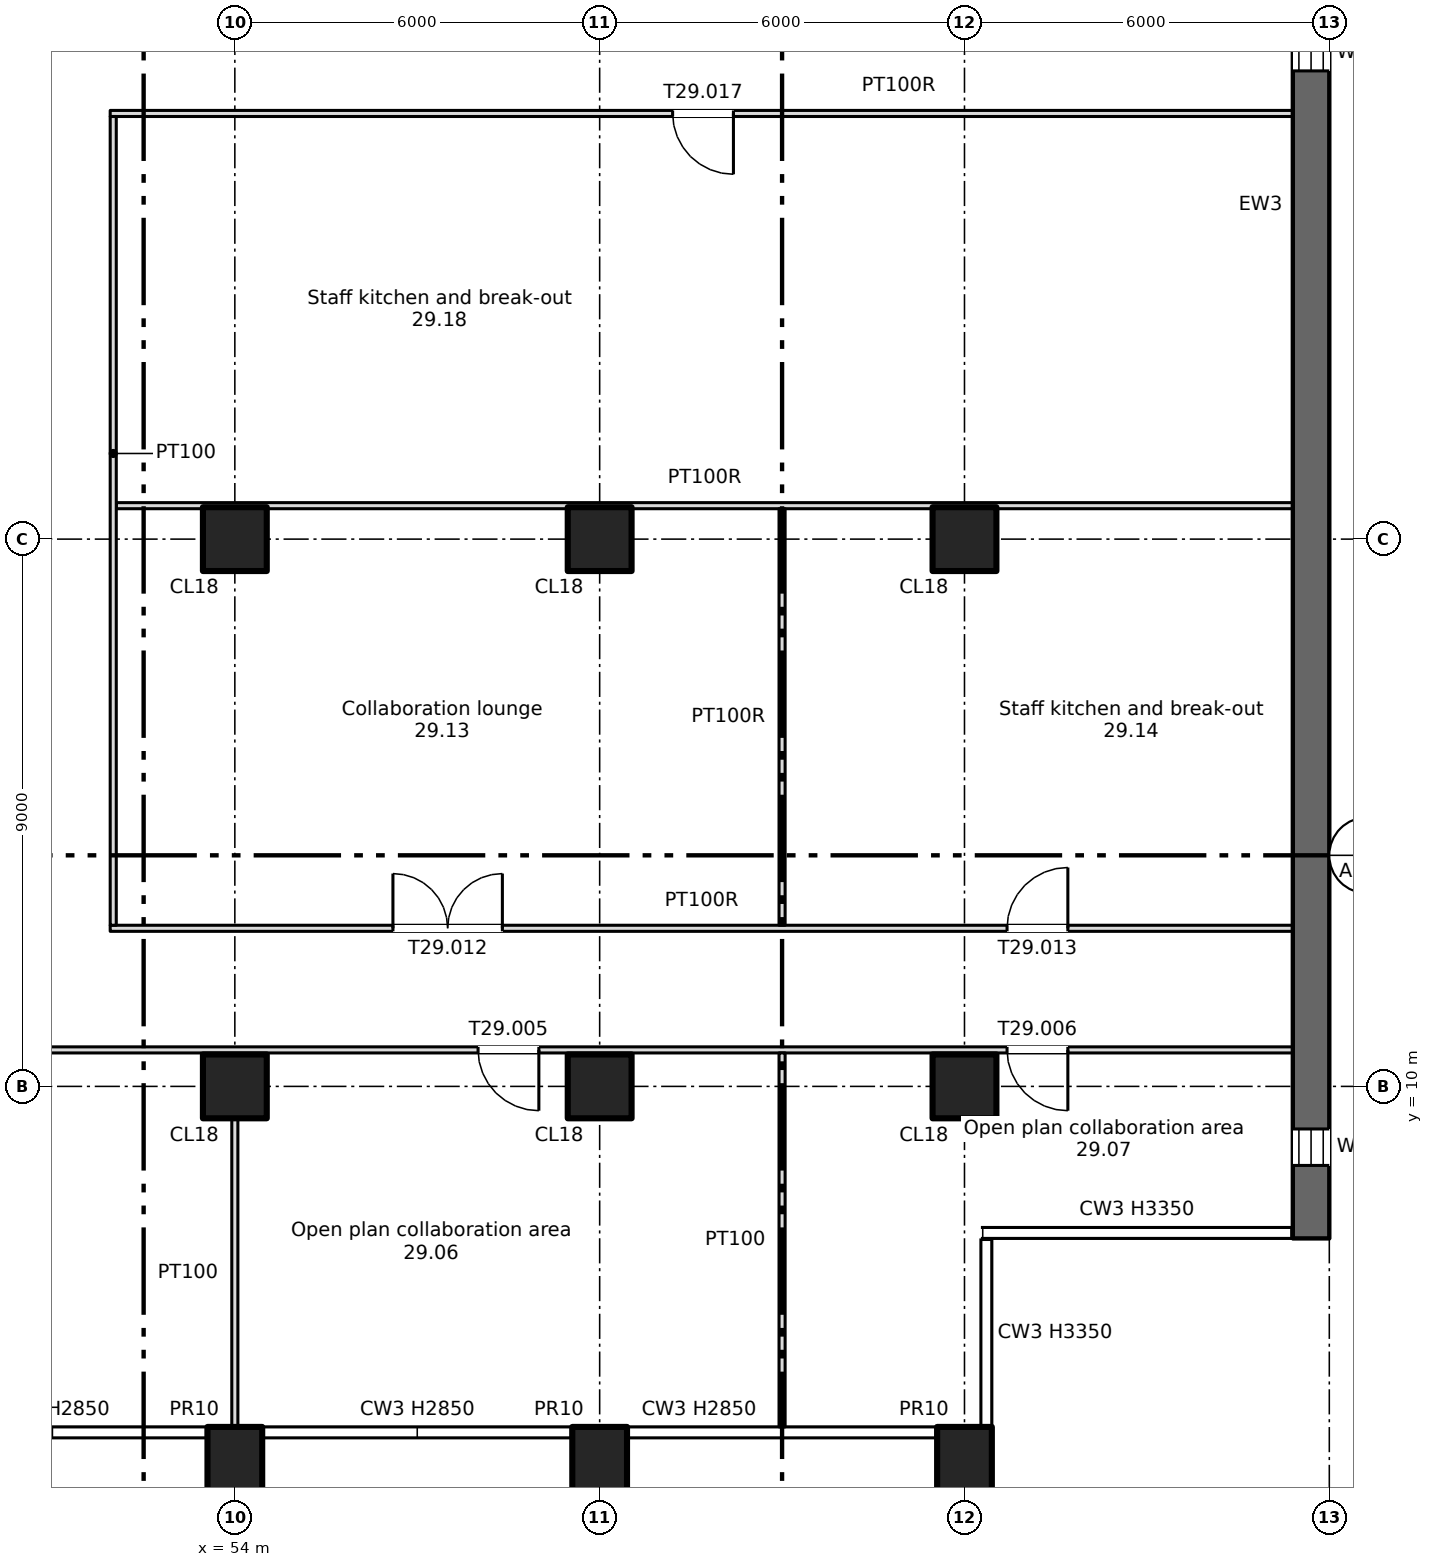
"""IFC4 building model, lengths in metres.
Left out: names, types, materials, properties, quantities, classifications, styles, units other than length and angle.
Written with IfcOpenShell. Run it as: python <this file> out.ifc"""

import sys

from ifc_helpers import new_model, si_unit, direction, frame, frame_2d, origin, origin_2d, place, context, subcontext, project, spatial, rectangle, extrude, element, fill, save


model = new_model("IFC4")
c1 = context("Model", 3, precision=1e-05, world=origin(), true_north=direction((0.0, 1.0)))
c2 = subcontext(c1, "Body", "Model", "MODEL_VIEW")
j1 = project(units=[si_unit("LENGTHUNIT", "METRE"), si_unit("PLANEANGLEUNIT", "RADIAN")], contexts=[c1])
p1 = place(None, origin())
s1 = spatial("IfcSite", under=j1, at=p1, CompositionType="ELEMENT")
p2 = place(p1, origin())
s2 = spatial("IfcBuilding", under=s1, at=p2, CompositionType="ELEMENT")
p3 = place(p2, frame((0.0, 0.0, 204.25)))
s3 = spatial("IfcBuildingStorey", under=s2, at=p3, CompositionType="ELEMENT", Elevation=204.25)
for number, where, z_axis, x_axis in (
    (1, (54.0, 3.7, -0.4), (0.0, 0.0, 1.0), (1.0, 0.0, 0.0)),
    (2, (60.0, 3.7, -0.4), (0.0, 0.0, 1.0), (1.0, 0.0, 0.0)),
    (3, (66.0, 3.7, -0.4), (0.0, 0.0, 1.0), (1.0, 0.0, 0.0)),
):
    element("IfcColumn", number, at=place(p3, frame(where, z_axis=z_axis, x_axis=x_axis)), inside=s3, PredefinedType="COLUMN", context=c2, shape_type="SweptSolid", body=[
        extrude(rectangle(XDim=0.9, YDim=1.4, at=origin_2d()), origin(), (0.0, 0.0, 1.0), 3.75),
    ])
for number, where, z_axis, x_axis in (
    (4, (54.0, 10.0, 0.0), (0.0, 0.0, 1.0), (1.0, 0.0, 0.0)),
    (5, (54.0, 19.0, 0.0), (0.0, 0.0, 1.0), (1.0, 0.0, 0.0)),
    (6, (60.0, 10.0, 0.0), (0.0, 0.0, 1.0), (1.0, 0.0, 0.0)),
    (7, (60.0, 19.0, 0.0), (0.0, 0.0, 1.0), (1.0, 0.0, 0.0)),
    (8, (66.0, 10.0, 0.0), (0.0, 0.0, 1.0), (1.0, 0.0, 0.0)),
    (9, (66.0, 19.0, 0.0), (0.0, 0.0, 1.0), (1.0, 0.0, 0.0)),
):
    element("IfcColumn", number, at=place(p3, frame(where, z_axis=z_axis, x_axis=x_axis)), inside=s3, PredefinedType="COLUMN", context=c2, shape_type="SweptSolid", body=[
        extrude(rectangle(XDim=1.05, YDim=1.05, at=origin_2d()), origin(), (0.0, 0.0, 1.0), 3.35),
    ])
p4 = place(p3, frame((71.7, 7.5, 0.0), z_axis=(0.0, 0.0, 1.0), x_axis=(0.0, 1.0, 0.0)))
e10 = element("IfcWall", 10, at=p4, inside=s3, PredefinedType="SHEAR", context=c2, shape_type="SweptSolid", body=[
    extrude(rectangle(XDim=34.0, YDim=0.6, at=frame_2d((17.0, 0.0))), origin(), (0.0, 0.0, 1.0), 3.35),
])
p5 = place(p4, frame((1.2, 0.0, 0.6)))
e11 = element("IfcOpeningElement", 11, at=p5, cuts=e10, PredefinedType="OPENING", context=c2, shape_type="SweptSolid", body=[
    extrude(rectangle(XDim=0.6, YDim=2.4, at=frame_2d((0.3, 1.2))), frame((0.0, 0.31, 0.0), z_axis=(0.0, -1.0, 0.0), x_axis=(1.0, 0.0, 0.0)), (0.0, 0.0, 1.0), 0.62),
])
p6 = place(p4, frame((19.2, 0.0, 0.6)))
e12 = element("IfcOpeningElement", 12, at=p6, cuts=e10, PredefinedType="OPENING", context=c2, shape_type="SweptSolid", body=[
    extrude(rectangle(XDim=0.6, YDim=2.4, at=frame_2d((0.3, 1.2))), frame((0.0, 0.31, 0.0), z_axis=(0.0, -1.0, 0.0), x_axis=(1.0, 0.0, 0.0)), (0.0, 0.0, 1.0), 0.62),
])
p7 = place(p4, frame((25.2, 0.0, 0.6)))
e13 = element("IfcOpeningElement", 13, at=p7, cuts=e10, PredefinedType="OPENING", context=c2, shape_type="SweptSolid", body=[
    extrude(rectangle(XDim=0.6, YDim=2.4, at=frame_2d((0.3, 1.2))), frame((0.0, 0.31, 0.0), z_axis=(0.0, -1.0, 0.0), x_axis=(1.0, 0.0, 0.0)), (0.0, 0.0, 1.0), 0.62),
])
p8 = place(p4, frame((31.2, 0.0, 0.6)))
e14 = element("IfcOpeningElement", 14, at=p8, cuts=e10, PredefinedType="OPENING", context=c2, shape_type="SweptSolid", body=[
    extrude(rectangle(XDim=0.6, YDim=2.4, at=frame_2d((0.3, 1.2))), frame((0.0, 0.31, 0.0), z_axis=(0.0, -1.0, 0.0), x_axis=(1.0, 0.0, 0.0)), (0.0, 0.0, 1.0), 0.62),
])
p9 = place(p3, frame((6.6, 10.6, 0.0), z_axis=(0.0, 0.0, 1.0), x_axis=(1.0, 0.0, 0.0)))
e15 = element("IfcWall", 15, at=p9, inside=s3, PredefinedType="PARTITIONING", context=c2, shape_type="SweptSolid", body=[
    extrude(rectangle(XDim=64.8, YDim=0.1, at=frame_2d((32.4, 0.0))), origin(), (0.0, 0.0, 1.0), 3.35),
])
p10 = place(p9, frame((12.0, 0.0, 0.0)))
e16 = element("IfcOpeningElement", 16, at=p10, cuts=e15, PredefinedType="OPENING", context=c2, shape_type="SweptSolid", body=[
    extrude(rectangle(XDim=1.8, YDim=2.1, at=frame_2d((0.9, 1.05))), frame((0.0, 0.06, 0.0), z_axis=(0.0, -1.0, 0.0), x_axis=(1.0, 0.0, 0.0)), (0.0, 0.0, 1.0), 0.12),
])
p11 = place(p9, frame((19.9, 0.0, 0.0)))
e17 = element("IfcOpeningElement", 17, at=p11, cuts=e15, PredefinedType="OPENING", context=c2, shape_type="SweptSolid", body=[
    extrude(rectangle(XDim=1.0, YDim=2.1, at=frame_2d((0.5, 1.05))), frame((0.0, 0.06, 0.0), z_axis=(0.0, -1.0, 0.0), x_axis=(1.0, 0.0, 0.0)), (0.0, 0.0, 1.0), 0.12),
])
p12 = place(p9, frame((30.0, 0.0, 0.0)))
e18 = element("IfcOpeningElement", 18, at=p12, cuts=e15, PredefinedType="OPENING", context=c2, shape_type="SweptSolid", body=[
    extrude(rectangle(XDim=1.8, YDim=2.1, at=frame_2d((0.9, 1.05))), frame((0.0, 0.06, 0.0), z_axis=(0.0, -1.0, 0.0), x_axis=(1.0, 0.0, 0.0)), (0.0, 0.0, 1.0), 0.12),
])
p13 = place(p9, frame((42.0, 0.0, 0.0)))
e19 = element("IfcOpeningElement", 19, at=p13, cuts=e15, PredefinedType="OPENING", context=c2, shape_type="SweptSolid", body=[
    extrude(rectangle(XDim=1.8, YDim=2.1, at=frame_2d((0.9, 1.05))), frame((0.0, 0.06, 0.0), z_axis=(0.0, -1.0, 0.0), x_axis=(1.0, 0.0, 0.0)), (0.0, 0.0, 1.0), 0.12),
])
p14 = place(p9, frame((51.4, 0.0, 0.0)))
e20 = element("IfcOpeningElement", 20, at=p14, cuts=e15, PredefinedType="OPENING", context=c2, shape_type="SweptSolid", body=[
    extrude(rectangle(XDim=1.0, YDim=2.1, at=frame_2d((0.5, 1.05))), frame((0.0, 0.06, 0.0), z_axis=(0.0, -1.0, 0.0), x_axis=(1.0, 0.0, 0.0)), (0.0, 0.0, 1.0), 0.12),
])
p15 = place(p9, frame((60.1, 0.0, 0.0)))
e21 = element("IfcOpeningElement", 21, at=p15, cuts=e15, PredefinedType="OPENING", context=c2, shape_type="SweptSolid", body=[
    extrude(rectangle(XDim=1.0, YDim=2.1, at=frame_2d((0.5, 1.05))), frame((0.0, 0.06, 0.0), z_axis=(0.0, -1.0, 0.0), x_axis=(1.0, 0.0, 0.0)), (0.0, 0.0, 1.0), 0.12),
])
p16 = place(p9, frame((2.2, 0.0, 0.0)))
e22 = element("IfcOpeningElement", 22, at=p16, cuts=e15, PredefinedType="OPENING", context=c2, shape_type="SweptSolid", body=[
    extrude(rectangle(XDim=1.0, YDim=2.1, at=frame_2d((0.5, 1.05))), frame((0.0, 0.06, 0.0), z_axis=(0.0, -1.0, 0.0), x_axis=(1.0, 0.0, 0.0)), (0.0, 0.0, 1.0), 0.12),
])
p17 = place(p3, frame((51.95, 12.6, 0.0), z_axis=(0.0, 0.0, 1.0), x_axis=(1.0, 0.0, 0.0)))
e23 = element("IfcWall", 23, at=p17, inside=s3, PredefinedType="PARTITIONING", context=c2, shape_type="SweptSolid", body=[
    extrude(rectangle(XDim=19.45, YDim=0.1, at=frame_2d((9.725, 0.0))), origin(), (0.0, 0.0, 1.0), 3.35),
])
p18 = place(p17, frame((4.65, 0.0, 0.0)))
e24 = element("IfcOpeningElement", 24, at=p18, cuts=e23, PredefinedType="OPENING", context=c2, shape_type="SweptSolid", body=[
    extrude(rectangle(XDim=1.8, YDim=2.1, at=frame_2d((0.9, 1.05))), frame((0.0, 0.06, 0.0), z_axis=(0.0, -1.0, 0.0), x_axis=(1.0, 0.0, 0.0)), (0.0, 0.0, 1.0), 0.12),
])
p19 = place(p17, frame((14.75, 0.0, 0.0)))
e25 = element("IfcOpeningElement", 25, at=p19, cuts=e23, PredefinedType="OPENING", context=c2, shape_type="SweptSolid", body=[
    extrude(rectangle(XDim=1.0, YDim=2.1, at=frame_2d((0.5, 1.05))), frame((0.0, 0.06, 0.0), z_axis=(0.0, -1.0, 0.0), x_axis=(1.0, 0.0, 0.0)), (0.0, 0.0, 1.0), 0.12),
])
p20 = place(p3, frame((52.05, 19.55, 0.0), z_axis=(0.0, 0.0, 1.0), x_axis=(1.0, 0.0, 0.0)))
e26 = element("IfcWall", 26, at=p20, inside=s3, PredefinedType="PARTITIONING", context=c2, shape_type="SweptSolid", body=[
    extrude(rectangle(XDim=19.35, YDim=0.1, at=frame_2d((9.675, 0.0))), origin(), (0.0, 0.0, 1.0), 3.35),
])
p21 = place(p3, frame((51.95, 26.0, 0.0), z_axis=(0.0, 0.0, 1.0), x_axis=(1.0, 0.0, 0.0)))
e27 = element("IfcWall", 27, at=p21, inside=s3, PredefinedType="PARTITIONING", context=c2, shape_type="SweptSolid", body=[
    extrude(rectangle(XDim=19.45, YDim=0.1, at=frame_2d((9.725, 0.0))), origin(), (0.0, 0.0, 1.0), 3.35),
])
p22 = place(p21, frame((9.25, 0.0, 0.0)))
e28 = element("IfcOpeningElement", 28, at=p22, cuts=e27, PredefinedType="OPENING", context=c2, shape_type="SweptSolid", body=[
    extrude(rectangle(XDim=1.0, YDim=2.1, at=frame_2d((0.5, 1.05))), frame((0.0, 0.06, 0.0), z_axis=(0.0, -1.0, 0.0), x_axis=(1.0, 0.0, 0.0)), (0.0, 0.0, 1.0), 0.12),
])
p23 = place(p3, frame((52.0, 12.65, 0.0), z_axis=(0.0, 0.0, 1.0), x_axis=(0.0, 1.0, 0.0)))
e29 = element("IfcWall", 29, at=p23, inside=s3, PredefinedType="PARTITIONING", context=c2, shape_type="SweptSolid", body=[
    extrude(rectangle(XDim=13.3, YDim=0.1, at=frame_2d((6.65, 0.0))), origin(), (0.0, 0.0, 1.0), 3.35),
])
p24 = place(p3, frame((54.0, 4.4, 0.0), z_axis=(0.0, 0.0, 1.0), x_axis=(0.0, 1.0, 0.0)))
e30 = element("IfcWall", 30, at=p24, inside=s3, PredefinedType="PARTITIONING", context=c2, shape_type="SweptSolid", body=[
    extrude(rectangle(XDim=5.075, YDim=0.1, at=frame_2d((2.538, 0.0))), origin(), (0.0, 0.0, 1.0), 3.35),
])
p25 = place(p3, frame((63.0, 4.4, 0.0), z_axis=(0.0, 0.0, 1.0), x_axis=(0.0, 1.0, 0.0)))
e31 = element("IfcWall", 31, at=p25, inside=s3, PredefinedType="PARTITIONING", context=c2, shape_type="SweptSolid", body=[
    extrude(rectangle(XDim=6.15, YDim=0.1, at=frame_2d((3.075, 0.0))), origin(), (0.0, 0.0, 1.0), 3.35),
])
p26 = place(p3, frame((63.0, 12.65, 0.0), z_axis=(0.0, 0.0, 1.0), x_axis=(0.0, 1.0, 0.0)))
e32 = element("IfcWall", 32, at=p26, inside=s3, PredefinedType="PARTITIONING", context=c2, shape_type="SweptSolid", body=[
    extrude(rectangle(XDim=6.85, YDim=0.1, at=frame_2d((3.425, 0.0))), origin(), (0.0, 0.0, 1.0), 3.35),
])
p27 = place(p5, origin())
e33 = element("IfcWindow", 33, at=p27, inside=s3, PartitioningType="SINGLE_PANEL", PredefinedType="WINDOW", context=c2, shape_type="SweptSolid", body=[
    extrude(rectangle(XDim=0.6, YDim=2.4, at=frame_2d((0.3, 1.2))), frame((0.0, 0.03, 0.0), z_axis=(0.0, -1.0, 0.0), x_axis=(1.0, 0.0, 0.0)), (0.0, 0.0, 1.0), 0.06),
])
fill(e11, e33)
p28 = place(p6, origin())
e34 = element("IfcWindow", 34, at=p28, inside=s3, PartitioningType="SINGLE_PANEL", PredefinedType="WINDOW", context=c2, shape_type="SweptSolid", body=[
    extrude(rectangle(XDim=0.6, YDim=2.4, at=frame_2d((0.3, 1.2))), frame((0.0, 0.03, 0.0), z_axis=(0.0, -1.0, 0.0), x_axis=(1.0, 0.0, 0.0)), (0.0, 0.0, 1.0), 0.06),
])
fill(e12, e34)
p29 = place(p14, origin())
e35 = element("IfcDoor", 35, at=p29, inside=s3, OperationType="SINGLE_SWING_RIGHT", PredefinedType="DOOR", context=c2, shape_type="SweptSolid", body=[
    extrude(rectangle(XDim=1.0, YDim=2.1, at=frame_2d((0.5, 1.05))), frame((0.0, 0.025, 0.0), z_axis=(0.0, -1.0, 0.0), x_axis=(1.0, 0.0, 0.0)), (0.0, 0.0, 1.0), 0.05),
])
fill(e20, e35)
p30 = place(p15, origin())
e36 = element("IfcDoor", 36, at=p30, inside=s3, OperationType="SINGLE_SWING_RIGHT", PredefinedType="DOOR", context=c2, shape_type="SweptSolid", body=[
    extrude(rectangle(XDim=1.0, YDim=2.1, at=frame_2d((0.5, 1.05))), frame((0.0, 0.025, 0.0), z_axis=(0.0, -1.0, 0.0), x_axis=(1.0, 0.0, 0.0)), (0.0, 0.0, 1.0), 0.05),
])
fill(e21, e36)
p31 = place(p18, origin())
e37 = element("IfcDoor", 37, at=p31, inside=s3, OperationType="DOUBLE_DOOR_SINGLE_SWING", PredefinedType="DOOR", context=c2, shape_type="SweptSolid", body=[
    extrude(rectangle(XDim=1.8, YDim=2.1, at=frame_2d((0.9, 1.05))), frame((0.0, 0.025, 0.0), z_axis=(0.0, -1.0, 0.0), x_axis=(1.0, 0.0, 0.0)), (0.0, 0.0, 1.0), 0.05),
])
fill(e24, e37)
p32 = place(p19, origin())
e38 = element("IfcDoor", 38, at=p32, inside=s3, OperationType="SINGLE_SWING_RIGHT", PredefinedType="DOOR", context=c2, shape_type="SweptSolid", body=[
    extrude(rectangle(XDim=1.0, YDim=2.1, at=frame_2d((0.5, 1.05))), frame((0.0, 0.025, 0.0), z_axis=(0.0, -1.0, 0.0), x_axis=(1.0, 0.0, 0.0)), (0.0, 0.0, 1.0), 0.05),
])
fill(e25, e38)
p33 = place(p22, origin())
e39 = element("IfcDoor", 39, at=p33, inside=s3, OperationType="SINGLE_SWING_RIGHT", PredefinedType="DOOR", context=c2, shape_type="SweptSolid", body=[
    extrude(rectangle(XDim=1.0, YDim=2.1, at=frame_2d((0.5, 1.05))), frame((0.0, 0.025, 0.0), z_axis=(0.0, -1.0, 0.0), x_axis=(1.0, 0.0, 0.0)), (0.0, 0.0, 1.0), 0.05),
])
fill(e28, e39)
save(model, sys.argv[1])
